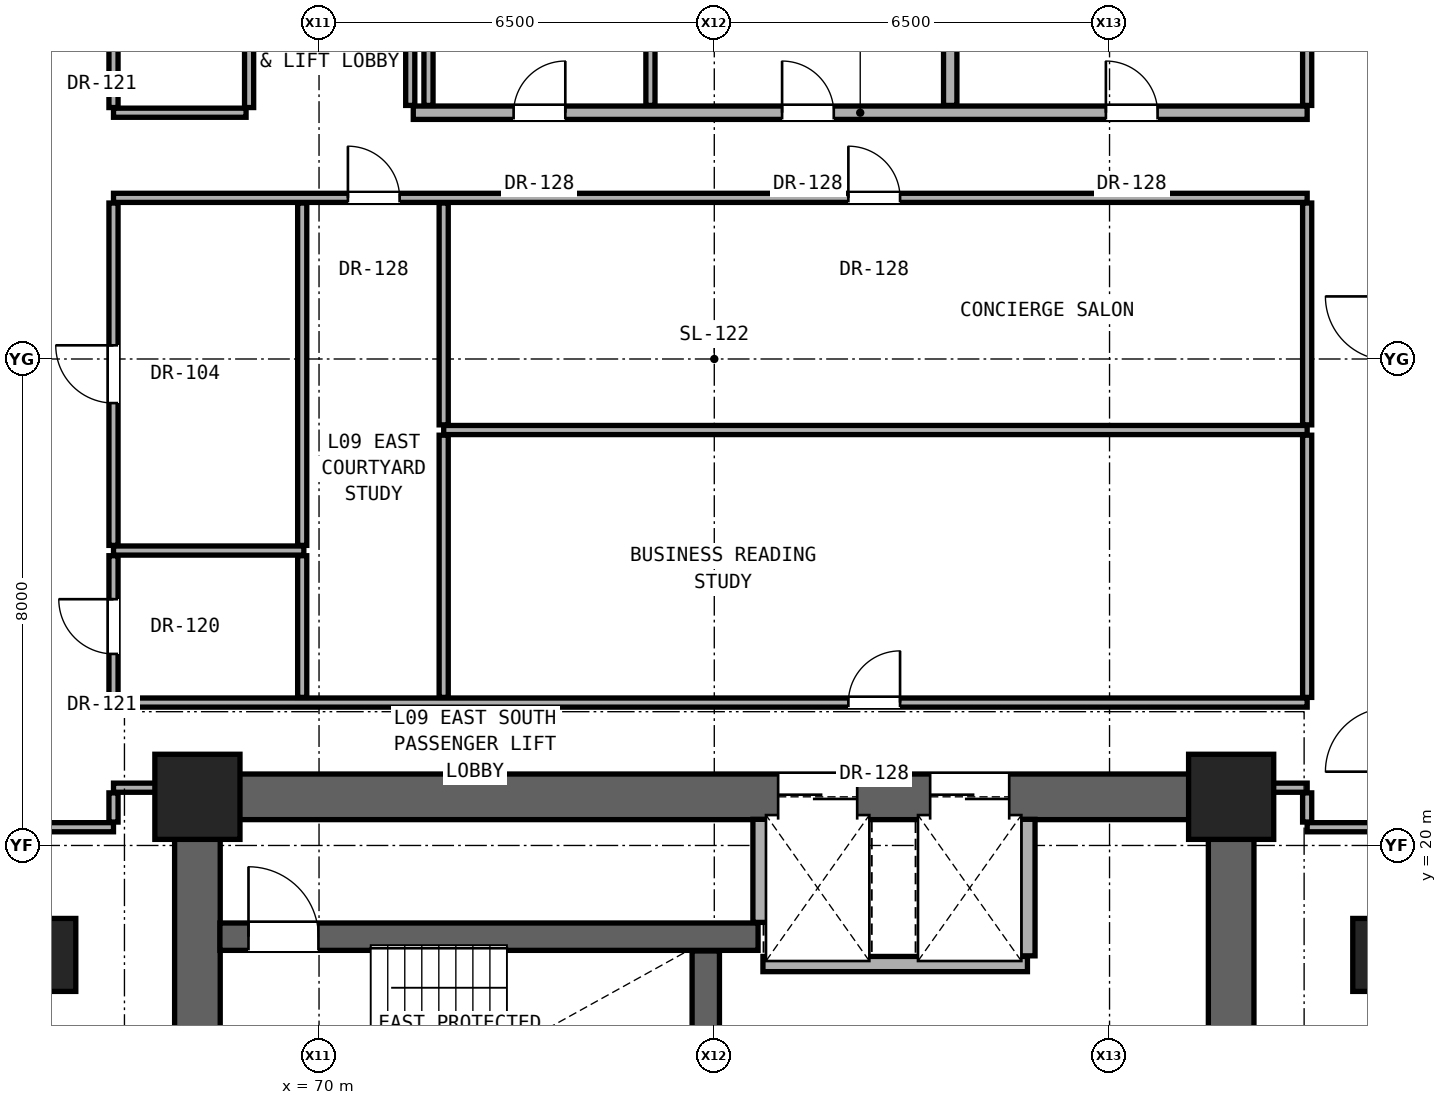
"""IFC4 building model, lengths in metres.
Left out: names, types, materials, properties, quantities, classifications, styles, units other than length and angle.
Written with IfcOpenShell. Run it as: python <this file> out.ifc"""

import sys

from ifc_helpers import new_model, si_unit, direction, frame, frame_2d, origin, origin_2d, place, context, subcontext, project, spatial, rectangle, extrude, element, fill, save


model = new_model("IFC4")
c1 = context("Model", 3, precision=1e-05, world=origin(), true_north=direction((0.0, 1.0)))
c2 = subcontext(c1, "Body", "Model", "MODEL_VIEW")
j1 = project(units=[si_unit("LENGTHUNIT", "METRE"), si_unit("PLANEANGLEUNIT", "RADIAN")], contexts=[c1])
p1 = place(None, origin())
s1 = spatial("IfcSite", under=j1, at=p1, CompositionType="ELEMENT")
p2 = place(p1, origin())
s2 = spatial("IfcBuilding", under=s1, at=p2, CompositionType="ELEMENT")
p3 = place(p2, frame((0.0, 0.0, 35.6)))
s3 = spatial("IfcBuildingStorey", under=s2, at=p3, CompositionType="ELEMENT", Elevation=35.6)
for number, where, z_axis, x_axis in (
    (1, (68.0, 20.8, 0.0), (0.0, 0.0, 1.0), (1.0, 0.0, 0.0)),
    (2, (85.0, 20.8, 0.0), (0.0, 0.0, 1.0), (1.0, 0.0, 0.0)),
):
    element("IfcColumn", number, at=place(p3, frame(where, z_axis=z_axis, x_axis=x_axis)), inside=s3, PredefinedType="COLUMN", context=c2, shape_type="SweptSolid", body=[
        extrude(rectangle(XDim=1.4, YDim=1.4, at=origin_2d()), origin(), (0.0, 0.0, 1.0), 3.3),
    ])
for number, where, z_axis, x_axis in (
    (3, (65.6, 18.2, 0.0), (0.0, 0.0, 1.0), (1.0, 0.0, 0.0)),
    (4, (87.4, 18.2, 0.0), (0.0, 0.0, 1.0), (1.0, 0.0, 0.0)),
):
    element("IfcColumn", number, at=place(p3, frame(where, z_axis=z_axis, x_axis=x_axis)), inside=s3, PredefinedType="PILASTER", context=c2, shape_type="SweptSolid", body=[
        extrude(rectangle(XDim=0.8, YDim=1.2, at=origin_2d()), origin(), (0.0, 0.0, 1.0), 3.3),
    ])
for number, where, z_axis, x_axis in (
    (5, (68.0, 15.2, 0.0), (0.0, 0.0, 1.0), (0.0, 1.0, 0.0)),
    (6, (85.0, 15.2, 0.0), (0.0, 0.0, 1.0), (0.0, 1.0, 0.0)),
):
    element("IfcWall", number, at=place(p3, frame(where, z_axis=z_axis, x_axis=x_axis)), inside=s3, PredefinedType="SHEAR", context=c2, shape_type="SweptSolid", body=[
        extrude(rectangle(XDim=5.6, YDim=0.75, at=frame_2d((2.8, 0.0))), origin(), (0.0, 0.0, 1.0), 3.06),
    ])
p4 = place(p3, frame((68.0, 20.8, 0.0), z_axis=(0.0, 0.0, 1.0), x_axis=(1.0, 0.0, 0.0)))
e7 = element("IfcWall", 7, at=p4, inside=s3, PredefinedType="SHEAR", context=c2, shape_type="SweptSolid", body=[
    extrude(rectangle(XDim=17.0, YDim=0.75, at=frame_2d((8.5, 0.0))), origin(), (0.0, 0.0, 1.0), 3.06),
])
p5 = place(p4, frame((9.55, 0.0, 0.0)))
e8 = element("IfcOpeningElement", 8, at=p5, cuts=e7, PredefinedType="OPENING", context=c2, shape_type="SweptSolid", body=[
    extrude(rectangle(XDim=1.3, YDim=2.3, at=frame_2d((0.65, 1.15))), frame((0.0, 0.385, 0.0), z_axis=(0.0, -1.0, 0.0), x_axis=(1.0, 0.0, 0.0)), (0.0, 0.0, 1.0), 0.77),
])
p6 = place(p4, frame((12.05, 0.0, 0.0)))
e9 = element("IfcOpeningElement", 9, at=p6, cuts=e7, PredefinedType="OPENING", context=c2, shape_type="SweptSolid", body=[
    extrude(rectangle(XDim=1.3, YDim=2.3, at=frame_2d((0.65, 1.15))), frame((0.0, 0.385, 0.0), z_axis=(0.0, -1.0, 0.0), x_axis=(1.0, 0.0, 0.0)), (0.0, 0.0, 1.0), 0.77),
])
p7 = place(p3, frame((77.3, 18.05, 0.0), z_axis=(0.0, 0.0, 1.0), x_axis=(1.0, 0.0, 0.0)))
e10 = element("IfcWall", 10, at=p7, inside=s3, PredefinedType="SOLIDWALL", context=c2, shape_type="SweptSolid", body=[
    extrude(rectangle(XDim=4.35, YDim=0.25, at=frame_2d((2.175, 0.0))), origin(), (0.0, 0.0, 1.0), 3.06),
])
p8 = place(p3, frame((68.37, 18.5, 0.0), z_axis=(0.0, 0.0, 1.0), x_axis=(1.0, 0.0, 0.0)))
e11 = element("IfcWall", 11, at=p8, inside=s3, PredefinedType="SHEAR", context=c2, shape_type="SweptSolid", body=[
    extrude(rectangle(XDim=8.85, YDim=0.45, at=frame_2d((4.425, 0.0))), origin(), (0.0, 0.0, 1.0), 3.06),
])
p9 = place(p8, frame((0.47, 0.0, 0.0)))
e12 = element("IfcOpeningElement", 12, at=p9, cuts=e11, PredefinedType="OPENING", context=c2, shape_type="SweptSolid", body=[
    extrude(rectangle(XDim=1.15, YDim=2.2, at=frame_2d((0.575, 1.1))), frame((0.0, 0.235, 0.0), z_axis=(0.0, -1.0, 0.0), x_axis=(1.0, 0.0, 0.0)), (0.0, 0.0, 1.0), 0.47),
])
p10 = place(p3, frame((65.25, 20.3, 0.0), z_axis=(0.0, 0.0, 1.0), x_axis=(1.0, 0.0, 0.0)))
e13 = element("IfcWall", 13, at=p10, inside=s3, PredefinedType="PARTITIONING", context=c2, shape_type="SweptSolid", body=[
    extrude(rectangle(XDim=1.37, YDim=0.15, at=frame_2d((0.685, 0.0))), origin(), (0.0, 0.0, 1.0), 3.06),
])
p11 = place(p3, frame((86.25, 20.3, 0.0), z_axis=(0.0, 0.0, 1.0), x_axis=(1.0, 0.0, 0.0)))
e14 = element("IfcWall", 14, at=p11, inside=s3, PredefinedType="PARTITIONING", context=c2, shape_type="SweptSolid", body=[
    extrude(rectangle(XDim=1.35, YDim=0.15, at=frame_2d((0.675, 0.0))), origin(), (0.0, 0.0, 1.0), 3.06),
])
p12 = place(p3, frame((66.62, 20.95, 0.0), z_axis=(0.0, 0.0, 1.0), x_axis=(1.0, 0.0, 0.0)))
e15 = element("IfcWall", 15, at=p12, inside=s3, PredefinedType="PARTITIONING", context=c2, shape_type="SweptSolid", body=[
    extrude(rectangle(XDim=1.01, YDim=0.15, at=frame_2d((0.505, 0.0))), origin(), (0.0, 0.0, 1.0), 2.452),
])
p13 = place(p3, frame((85.37, 20.95, 0.0), z_axis=(0.0, 0.0, 1.0), x_axis=(1.0, 0.0, 0.0)))
e16 = element("IfcWall", 16, at=p13, inside=s3, PredefinedType="PARTITIONING", context=c2, shape_type="SweptSolid", body=[
    extrude(rectangle(XDim=0.88, YDim=0.15, at=frame_2d((0.44, 0.0))), origin(), (0.0, 0.0, 1.0), 2.452),
])
p14 = place(p3, frame((66.62, 22.35, 0.0), z_axis=(0.0, 0.0, 1.0), x_axis=(1.0, 0.0, 0.0)))
e17 = element("IfcWall", 17, at=p14, inside=s3, PredefinedType="PARTITIONING", context=c2, shape_type="SweptSolid", body=[
    extrude(rectangle(XDim=19.63, YDim=0.15, at=frame_2d((9.815, 0.0))), origin(), (0.0, 0.0, 1.0), 2.125),
])
p15 = place(p14, frame((12.085, 0.0, 0.0)))
e18 = element("IfcOpeningElement", 18, at=p15, cuts=e17, PredefinedType="OPENING", context=c2, shape_type="SweptSolid", body=[
    extrude(rectangle(XDim=0.85, YDim=2.01, at=frame_2d((0.425, 1.005))), frame((0.0, 0.085, 0.0), z_axis=(0.0, -1.0, 0.0), x_axis=(1.0, 0.0, 0.0)), (0.0, 0.0, 1.0), 0.17),
])
p16 = place(p3, frame((66.62, 24.85, 0.0), z_axis=(0.0, 0.0, 1.0), x_axis=(1.0, 0.0, 0.0)))
e19 = element("IfcWall", 19, at=p16, inside=s3, PredefinedType="PARTITIONING", context=c2, shape_type="SweptSolid", body=[
    extrude(rectangle(XDim=3.13, YDim=0.15, at=frame_2d((1.565, 0.0))), origin(), (0.0, 0.0, 1.0), 2.125),
])
p17 = place(p3, frame((72.05, 26.832, 0.0), z_axis=(0.0, 0.0, 1.0), x_axis=(1.0, 0.0, 0.0)))
e20 = element("IfcWall", 20, at=p17, inside=s3, PredefinedType="PARTITIONING", context=c2, shape_type="SweptSolid", body=[
    extrude(rectangle(XDim=14.2, YDim=0.15, at=frame_2d((7.1, 0.0))), origin(), (0.0, 0.0, 1.0), 2.125),
])
p18 = place(p3, frame((66.62, 30.65, 0.0), z_axis=(0.0, 0.0, 1.0), x_axis=(1.0, 0.0, 0.0)))
e21 = element("IfcWall", 21, at=p18, inside=s3, PredefinedType="PARTITIONING", context=c2, shape_type="SweptSolid", body=[
    extrude(rectangle(XDim=19.63, YDim=0.15, at=frame_2d((9.815, 0.0))), origin(), (0.0, 0.0, 1.0), 2.125),
])
p19 = place(p18, frame((3.855, 0.0, 0.0)))
e22 = element("IfcOpeningElement", 22, at=p19, cuts=e21, PredefinedType="OPENING", context=c2, shape_type="SweptSolid", body=[
    extrude(rectangle(XDim=0.85, YDim=2.01, at=frame_2d((0.425, 1.005))), frame((0.0, 0.085, 0.0), z_axis=(0.0, -1.0, 0.0), x_axis=(1.0, 0.0, 0.0)), (0.0, 0.0, 1.0), 0.17),
])
p20 = place(p18, frame((12.085, 0.0, 0.0)))
e23 = element("IfcOpeningElement", 23, at=p20, cuts=e21, PredefinedType="OPENING", context=c2, shape_type="SweptSolid", body=[
    extrude(rectangle(XDim=0.85, YDim=2.01, at=frame_2d((0.425, 1.005))), frame((0.0, 0.085, 0.0), z_axis=(0.0, -1.0, 0.0), x_axis=(1.0, 0.0, 0.0)), (0.0, 0.0, 1.0), 0.17),
])
p21 = place(p3, frame((66.62, 32.05, 0.0), z_axis=(0.0, 0.0, 1.0), x_axis=(1.0, 0.0, 0.0)))
e24 = element("IfcWall", 24, at=p21, inside=s3, PredefinedType="PARTITIONING", context=c2, shape_type="SweptSolid", body=[
    extrude(rectangle(XDim=2.18, YDim=0.15, at=frame_2d((1.09, 0.0))), origin(), (0.0, 0.0, 1.0), 2.125),
])
p22 = place(p3, frame((71.55, 32.05, 0.0), z_axis=(0.0, 0.0, 1.0), x_axis=(1.0, 0.0, 0.0)))
e25 = element("IfcWall", 25, at=p22, inside=s3, PredefinedType="SOLIDWALL", context=c2, shape_type="SweptSolid", body=[
    extrude(rectangle(XDim=14.7, YDim=0.22, at=frame_2d((7.35, 0.0))), origin(), (0.0, 0.0, 1.0), 2.125),
])
p23 = place(p22, frame((11.39, 0.0, 0.0)))
e26 = element("IfcOpeningElement", 26, at=p23, cuts=e25, PredefinedType="OPENING", context=c2, shape_type="SweptSolid", body=[
    extrude(rectangle(XDim=0.85, YDim=2.01, at=frame_2d((0.425, 1.005))), frame((0.0, 0.12, 0.0), z_axis=(0.0, -1.0, 0.0), x_axis=(1.0, 0.0, 0.0)), (0.0, 0.0, 1.0), 0.24),
])
p24 = place(p22, frame((6.065, 0.0, 0.0)))
e27 = element("IfcOpeningElement", 27, at=p24, cuts=e25, PredefinedType="OPENING", context=c2, shape_type="SweptSolid", body=[
    extrude(rectangle(XDim=0.85, YDim=2.01, at=frame_2d((0.425, 1.005))), frame((0.0, 0.12, 0.0), z_axis=(0.0, -1.0, 0.0), x_axis=(1.0, 0.0, 0.0)), (0.0, 0.0, 1.0), 0.24),
])
p25 = place(p22, frame((1.65, 0.0, 0.0)))
e28 = element("IfcOpeningElement", 28, at=p25, cuts=e25, PredefinedType="OPENING", context=c2, shape_type="SweptSolid", body=[
    extrude(rectangle(XDim=0.85, YDim=2.01, at=frame_2d((0.425, 1.005))), frame((0.0, 0.12, 0.0), z_axis=(0.0, -1.0, 0.0), x_axis=(1.0, 0.0, 0.0)), (0.0, 0.0, 1.0), 0.24),
])
p26 = place(p3, frame((66.62, 20.385, 0.0), z_axis=(0.0, 0.0, 1.0), x_axis=(0.0, 1.0, 0.0)))
e29 = element("IfcWall", 29, at=p26, inside=s3, PredefinedType="PARTITIONING", context=c2, shape_type="SweptSolid", body=[
    extrude(rectangle(XDim=0.48, YDim=0.15, at=frame_2d((0.24, 0.0))), origin(), (0.0, 0.0, 1.0), 2.452),
])
p27 = place(p3, frame((66.62, 22.435, 0.0), z_axis=(0.0, 0.0, 1.0), x_axis=(0.0, 1.0, 0.0)))
e30 = element("IfcWall", 30, at=p27, inside=s3, PredefinedType="PARTITIONING", context=c2, shape_type="SweptSolid", body=[
    extrude(rectangle(XDim=2.33, YDim=0.15, at=frame_2d((1.165, 0.0))), origin(), (0.0, 0.0, 1.0), 3.06),
])
p28 = place(p27, frame((0.715, 0.0, 0.0)))
e31 = element("IfcOpeningElement", 31, at=p28, cuts=e30, PredefinedType="OPENING", context=c2, shape_type="SweptSolid", body=[
    extrude(rectangle(XDim=0.9, YDim=2.1, at=frame_2d((0.45, 1.05))), frame((0.0, 0.085, 0.0), z_axis=(0.0, -1.0, 0.0), x_axis=(1.0, 0.0, 0.0)), (0.0, 0.0, 1.0), 0.17),
])
p29 = place(p3, frame((66.62, 24.935, 0.0), z_axis=(0.0, 0.0, 1.0), x_axis=(0.0, 1.0, 0.0)))
e32 = element("IfcWall", 32, at=p29, inside=s3, PredefinedType="PARTITIONING", context=c2, shape_type="SweptSolid", body=[
    extrude(rectangle(XDim=5.63, YDim=0.15, at=frame_2d((2.815, 0.0))), origin(), (0.0, 0.0, 1.0), 2.279),
])
p30 = place(p29, frame((2.34, 0.0, 0.0)))
e33 = element("IfcOpeningElement", 33, at=p30, cuts=e32, PredefinedType="OPENING", context=c2, shape_type="SweptSolid", body=[
    extrude(rectangle(XDim=0.95, YDim=2.15, at=frame_2d((0.475, 1.075))), frame((0.0, 0.085, 0.0), z_axis=(0.0, -1.0, 0.0), x_axis=(1.0, 0.0, 0.0)), (0.0, 0.0, 1.0), 0.17),
])
p31 = place(p3, frame((66.62, 32.135, 0.0), z_axis=(0.0, 0.0, 1.0), x_axis=(0.0, 1.0, 0.0)))
e34 = element("IfcWall", 34, at=p31, inside=s3, PredefinedType="PARTITIONING", context=c2, shape_type="SweptSolid", body=[
    extrude(rectangle(XDim=3.48, YDim=0.15, at=frame_2d((1.74, 0.0))), origin(), (0.0, 0.0, 1.0), 2.452),
])
p32 = place(p3, frame((68.85, 32.135, 0.0), z_axis=(0.0, 0.0, 1.0), x_axis=(0.0, 1.0, 0.0)))
e35 = element("IfcWall", 35, at=p32, inside=s3, PredefinedType="PARTITIONING", context=c2, shape_type="SweptSolid", body=[
    extrude(rectangle(XDim=2.695, YDim=0.15, at=frame_2d((1.348, 0.0))), origin(), (0.0, 0.0, 1.0), 3.06),
])
p33 = place(p3, frame((69.723, 22.435, 0.0), z_axis=(0.0, 0.0, 1.0), x_axis=(0.0, 1.0, 0.0)))
e36 = element("IfcWall", 36, at=p33, inside=s3, PredefinedType="PARTITIONING", context=c2, shape_type="SweptSolid", body=[
    extrude(rectangle(XDim=2.33, YDim=0.15, at=frame_2d((1.165, 0.0))), origin(), (0.0, 0.0, 1.0), 3.06),
])
p34 = place(p3, frame((69.723, 24.935, 0.0), z_axis=(0.0, 0.0, 1.0), x_axis=(0.0, 1.0, 0.0)))
e37 = element("IfcWall", 37, at=p34, inside=s3, PredefinedType="PARTITIONING", context=c2, shape_type="SweptSolid", body=[
    extrude(rectangle(XDim=5.63, YDim=0.15, at=frame_2d((2.815, 0.0))), origin(), (0.0, 0.0, 1.0), 2.125),
])
for number, where, z_axis, x_axis in (
    (38, (71.5, 32.17, 0.0), (0.0, 0.0, 1.0), (0.0, 1.0, 0.0)),
    (39, (71.8, 32.17, 0.0), (0.0, 0.0, 1.0), (0.0, 1.0, 0.0)),
):
    element("IfcWall", number, at=place(p3, frame(where, z_axis=z_axis, x_axis=x_axis)), inside=s3, PredefinedType="PARTITIONING", context=c2, shape_type="SweptSolid", body=[
        extrude(rectangle(XDim=2.66, YDim=0.15, at=frame_2d((1.33, 0.0))), origin(), (0.0, 0.0, 1.0), 3.06),
    ])
p35 = place(p3, frame((72.05, 22.435, 0.0), z_axis=(0.0, 0.0, 1.0), x_axis=(0.0, 1.0, 0.0)))
e40 = element("IfcWall", 40, at=p35, inside=s3, PredefinedType="PARTITIONING", context=c2, shape_type="SweptSolid", body=[
    extrude(rectangle(XDim=4.312, YDim=0.15, at=frame_2d((2.156, 0.0))), origin(), (0.0, 0.0, 1.0), 2.589),
])
p36 = place(p3, frame((72.05, 26.917, 0.0), z_axis=(0.0, 0.0, 1.0), x_axis=(0.0, 1.0, 0.0)))
e41 = element("IfcWall", 41, at=p36, inside=s3, PredefinedType="PARTITIONING", context=c2, shape_type="SweptSolid", body=[
    extrude(rectangle(XDim=3.648, YDim=0.15, at=frame_2d((1.824, 0.0))), origin(), (0.0, 0.0, 1.0), 2.125),
])
p37 = place(p3, frame((75.45, 32.17, 0.0), z_axis=(0.0, 0.0, 1.0), x_axis=(0.0, 1.0, 0.0)))
e42 = element("IfcWall", 42, at=p37, inside=s3, PredefinedType="PARTITIONING", context=c2, shape_type="SweptSolid", body=[
    extrude(rectangle(XDim=2.66, YDim=0.15, at=frame_2d((1.33, 0.0))), origin(), (0.0, 0.0, 1.0), 3.06),
])
p38 = place(p3, frame((76.36, 15.915, 0.0), z_axis=(0.0, 0.0, 1.0), x_axis=(0.0, 1.0, 0.0)))
e43 = element("IfcWall", 43, at=p38, inside=s3, PredefinedType="SHEAR", context=c2, shape_type="SweptSolid", body=[
    extrude(rectangle(XDim=2.35, YDim=0.45, at=frame_2d((1.175, 0.0))), origin(), (0.0, 0.0, 1.0), 3.06),
])
p39 = place(p3, frame((77.26, 18.735, 0.0), z_axis=(0.0, 0.0, 1.0), x_axis=(0.0, 1.0, 0.0)))
e44 = element("IfcWall", 44, at=p39, inside=s3, PredefinedType="SOLIDWALL", context=c2, shape_type="SweptSolid", body=[
    extrude(rectangle(XDim=1.695, YDim=0.25, at=frame_2d((0.847, 0.0))), origin(), (0.0, 0.0, 1.0), 3.06),
])
p40 = place(p3, frame((80.38, 32.17, 0.0), z_axis=(0.0, 0.0, 1.0), x_axis=(0.0, 1.0, 0.0)))
e45 = element("IfcWall", 45, at=p40, inside=s3, PredefinedType="SOLIDWALL", context=c2, shape_type="SweptSolid", body=[
    extrude(rectangle(XDim=2.66, YDim=0.22, at=frame_2d((1.33, 0.0))), origin(), (0.0, 0.0, 1.0), 3.06),
])
p41 = place(p3, frame((81.65, 18.185, 0.0), z_axis=(0.0, 0.0, 1.0), x_axis=(0.0, 1.0, 0.0)))
e46 = element("IfcWall", 46, at=p41, inside=s3, PredefinedType="SOLIDWALL", context=c2, shape_type="SweptSolid", body=[
    extrude(rectangle(XDim=2.245, YDim=0.25, at=frame_2d((1.123, 0.0))), origin(), (0.0, 0.0, 1.0), 3.06),
])
p42 = place(p3, frame((86.25, 20.385, 0.0), z_axis=(0.0, 0.0, 1.0), x_axis=(0.0, 1.0, 0.0)))
e47 = element("IfcWall", 47, at=p42, inside=s3, PredefinedType="PARTITIONING", context=c2, shape_type="SweptSolid", body=[
    extrude(rectangle(XDim=0.48, YDim=0.15, at=frame_2d((0.24, 0.0))), origin(), (0.0, 0.0, 1.0), 2.452),
])
p43 = place(p3, frame((86.25, 22.435, 0.0), z_axis=(0.0, 0.0, 1.0), x_axis=(0.0, 1.0, 0.0)))
e48 = element("IfcWall", 48, at=p43, inside=s3, PredefinedType="PARTITIONING", context=c2, shape_type="SweptSolid", body=[
    extrude(rectangle(XDim=4.312, YDim=0.15, at=frame_2d((2.156, 0.0))), origin(), (0.0, 0.0, 1.0), 3.06),
])
p44 = place(p3, frame((86.25, 26.917, 0.0), z_axis=(0.0, 0.0, 1.0), x_axis=(0.0, 1.0, 0.0)))
e49 = element("IfcWall", 49, at=p44, inside=s3, PredefinedType="PARTITIONING", context=c2, shape_type="SweptSolid", body=[
    extrude(rectangle(XDim=3.648, YDim=0.15, at=frame_2d((1.824, 0.0))), origin(), (0.0, 0.0, 1.0), 2.279),
])
p45 = place(p3, frame((86.25, 32.17, 0.0), z_axis=(0.0, 0.0, 1.0), x_axis=(0.0, 1.0, 0.0)))
e50 = element("IfcWall", 50, at=p45, inside=s3, PredefinedType="PARTITIONING", context=c2, shape_type="SweptSolid", body=[
    extrude(rectangle(XDim=2.795, YDim=0.15, at=frame_2d((1.397, 0.0))), origin(), (0.0, 0.0, 1.0), 2.452),
])
p46 = place(p23, origin())
e51 = element("IfcDoor", 51, at=p46, inside=s3, OperationType="SINGLE_SWING_LEFT", PredefinedType="DOOR", context=c2, shape_type="SweptSolid", body=[
    extrude(rectangle(XDim=0.85, YDim=2.01, at=frame_2d((0.425, 1.005))), frame((0.0, 0.025, 0.0), z_axis=(0.0, -1.0, 0.0), x_axis=(1.0, 0.0, 0.0)), (0.0, 0.0, 1.0), 0.05),
])
fill(e26, e51)
p47 = place(p24, origin())
e52 = element("IfcDoor", 52, at=p47, inside=s3, OperationType="SINGLE_SWING_LEFT", PredefinedType="DOOR", context=c2, shape_type="SweptSolid", body=[
    extrude(rectangle(XDim=0.85, YDim=2.01, at=frame_2d((0.425, 1.005))), frame((0.0, 0.025, 0.0), z_axis=(0.0, -1.0, 0.0), x_axis=(1.0, 0.0, 0.0)), (0.0, 0.0, 1.0), 0.05),
])
fill(e27, e52)
p48 = place(p25, origin())
e53 = element("IfcDoor", 53, at=p48, inside=s3, OperationType="SINGLE_SWING_RIGHT", PredefinedType="DOOR", context=c2, shape_type="SweptSolid", body=[
    extrude(rectangle(XDim=0.85, YDim=2.01, at=frame_2d((0.425, 1.005))), frame((0.0, 0.025, 0.0), z_axis=(0.0, -1.0, 0.0), x_axis=(1.0, 0.0, 0.0)), (0.0, 0.0, 1.0), 0.05),
])
fill(e28, e53)
p49 = place(p9, origin())
e54 = element("IfcDoor", 54, at=p49, inside=s3, OperationType="SINGLE_SWING_LEFT", PredefinedType="DOOR", context=c2, shape_type="SweptSolid", body=[
    extrude(rectangle(XDim=1.15, YDim=2.2, at=frame_2d((0.575, 1.1))), frame((0.0, 0.025, 0.0), z_axis=(0.0, -1.0, 0.0), x_axis=(1.0, 0.0, 0.0)), (0.0, 0.0, 1.0), 0.05),
])
fill(e12, e54)
p50 = place(p28, origin())
e55 = element("IfcDoor", 55, at=p50, inside=s3, OperationType="SINGLE_SWING_RIGHT", PredefinedType="DOOR", context=c2, shape_type="SweptSolid", body=[
    extrude(rectangle(XDim=0.9, YDim=2.1, at=frame_2d((0.45, 1.05))), frame((0.0, 0.025, 0.0), z_axis=(0.0, -1.0, 0.0), x_axis=(1.0, 0.0, 0.0)), (0.0, 0.0, 1.0), 0.05),
])
fill(e31, e55)
p51 = place(p30, origin())
e56 = element("IfcDoor", 56, at=p51, inside=s3, OperationType="SINGLE_SWING_RIGHT", PredefinedType="DOOR", context=c2, shape_type="SweptSolid", body=[
    extrude(rectangle(XDim=0.95, YDim=2.15, at=frame_2d((0.475, 1.075))), frame((0.0, 0.025, 0.0), z_axis=(0.0, -1.0, 0.0), x_axis=(1.0, 0.0, 0.0)), (0.0, 0.0, 1.0), 0.05),
])
fill(e33, e56)
p52 = place(p19, origin())
e57 = element("IfcDoor", 57, at=p52, inside=s3, OperationType="SINGLE_SWING_LEFT", PredefinedType="DOOR", context=c2, shape_type="SweptSolid", body=[
    extrude(rectangle(XDim=0.85, YDim=2.01, at=frame_2d((0.425, 1.005))), frame((0.0, 0.025, 0.0), z_axis=(0.0, -1.0, 0.0), x_axis=(1.0, 0.0, 0.0)), (0.0, 0.0, 1.0), 0.05),
])
fill(e22, e57)
p53 = place(p15, origin())
e58 = element("IfcDoor", 58, at=p53, inside=s3, OperationType="SINGLE_SWING_RIGHT", PredefinedType="DOOR", context=c2, shape_type="SweptSolid", body=[
    extrude(rectangle(XDim=0.85, YDim=2.01, at=frame_2d((0.425, 1.005))), frame((0.0, 0.025, 0.0), z_axis=(0.0, -1.0, 0.0), x_axis=(1.0, 0.0, 0.0)), (0.0, 0.0, 1.0), 0.05),
])
fill(e18, e58)
p54 = place(p20, origin())
e59 = element("IfcDoor", 59, at=p54, inside=s3, OperationType="SINGLE_SWING_LEFT", PredefinedType="DOOR", context=c2, shape_type="SweptSolid", body=[
    extrude(rectangle(XDim=0.85, YDim=2.01, at=frame_2d((0.425, 1.005))), frame((0.0, 0.025, 0.0), z_axis=(0.0, -1.0, 0.0), x_axis=(1.0, 0.0, 0.0)), (0.0, 0.0, 1.0), 0.05),
])
fill(e23, e59)
p55 = place(p5, origin())
e60 = element("IfcDoor", 60, at=p55, inside=s3, OperationType="DOUBLE_DOOR_SLIDING", PredefinedType="DOOR", context=c2, shape_type="SweptSolid", body=[
    extrude(rectangle(XDim=1.3, YDim=2.3, at=frame_2d((0.65, 1.15))), frame((0.0, 0.025, 0.0), z_axis=(0.0, -1.0, 0.0), x_axis=(1.0, 0.0, 0.0)), (0.0, 0.0, 1.0), 0.05),
])
fill(e8, e60)
p56 = place(p6, origin())
e61 = element("IfcDoor", 61, at=p56, inside=s3, OperationType="DOUBLE_DOOR_SLIDING", PredefinedType="DOOR", context=c2, shape_type="SweptSolid", body=[
    extrude(rectangle(XDim=1.3, YDim=2.3, at=frame_2d((0.65, 1.15))), frame((0.0, 0.025, 0.0), z_axis=(0.0, -1.0, 0.0), x_axis=(1.0, 0.0, 0.0)), (0.0, 0.0, 1.0), 0.05),
])
fill(e9, e61)
save(model, sys.argv[1])
